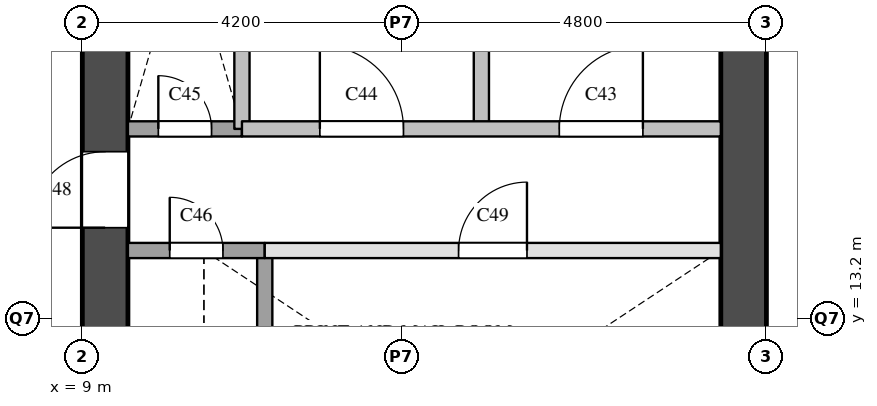
"""IFC4 building model, lengths in metres.
Left out: names, types, materials, properties, quantities, classifications, styles, units other than length and angle.
Written with IfcOpenShell. Run it as: python <this file> out.ifc"""

import sys

from ifc_helpers import new_model, si_unit, direction, frame, frame_2d, origin, place, context, subcontext, project, spatial, rectangle, extrude, element, fill, save


model = new_model("IFC4")
c1 = context("Model", 3, precision=1e-05, world=origin(), true_north=direction((0.0, 1.0)))
c2 = subcontext(c1, "Body", "Model", "MODEL_VIEW")
j1 = project(units=[si_unit("LENGTHUNIT", "METRE"), si_unit("PLANEANGLEUNIT", "RADIAN")], contexts=[c1])
p1 = place(None, origin())
s1 = spatial("IfcSite", under=j1, at=p1, CompositionType="ELEMENT")
p2 = place(p1, origin())
s2 = spatial("IfcBuilding", under=s1, at=p2, CompositionType="ELEMENT")
p3 = place(p2, frame((0.0, 0.0, 50.0)))
s3 = spatial("IfcBuildingStorey", under=s2, at=p3, CompositionType="ELEMENT", Elevation=50.0)
p4 = place(p3, frame((9.3, 9.6, 0.0), z_axis=(0.0, 0.0, 1.0), x_axis=(0.0, 1.0, 0.0)))
e1 = element("IfcWall", 1, at=p4, inside=s3, PredefinedType="SHEAR", context=c2, shape_type="SweptSolid", body=[
    extrude(rectangle(XDim=12.3, YDim=0.6, at=frame_2d((6.15, 0.0))), origin(), (0.0, 0.0, 1.0), 3.5),
])
p5 = place(p4, frame((0.8, 0.0, 0.0)))
e2 = element("IfcOpeningElement", 2, at=p5, cuts=e1, PredefinedType="OPENING", context=c2, shape_type="SweptSolid", body=[
    extrude(rectangle(XDim=0.7, YDim=2.1, at=frame_2d((0.35, 1.05))), frame((0.0, 0.31, 0.0), z_axis=(0.0, -1.0, 0.0), x_axis=(1.0, 0.0, 0.0)), (0.0, 0.0, 1.0), 0.62),
])
p6 = place(p4, frame((4.8, 0.0, 0.0)))
e3 = element("IfcOpeningElement", 3, at=p6, cuts=e1, PredefinedType="OPENING", context=c2, shape_type="SweptSolid", body=[
    extrude(rectangle(XDim=1.0, YDim=2.1, at=frame_2d((0.5, 1.05))), frame((0.0, 0.31, 0.0), z_axis=(0.0, -1.0, 0.0), x_axis=(1.0, 0.0, 0.0)), (0.0, 0.0, 1.0), 0.62),
])
p7 = place(p3, frame((17.7, 9.6, 0.0), z_axis=(0.0, 0.0, 1.0), x_axis=(0.0, 1.0, 0.0)))
e4 = element("IfcWall", 4, at=p7, inside=s3, PredefinedType="SHEAR", context=c2, shape_type="SweptSolid", body=[
    extrude(rectangle(XDim=12.3, YDim=0.6, at=frame_2d((6.15, 0.0))), origin(), (0.0, 0.0, 1.0), 3.5),
])
p8 = place(p7, frame((0.525, 0.0, 0.0)))
e5 = element("IfcOpeningElement", 5, at=p8, cuts=e4, PredefinedType="OPENING", context=c2, shape_type="SweptSolid", body=[
    extrude(rectangle(XDim=1.2, YDim=2.1, at=frame_2d((0.6, 1.05))), frame((0.0, 0.31, 0.0), z_axis=(0.0, -1.0, 0.0), x_axis=(1.0, 0.0, 0.0)), (0.0, 0.0, 1.0), 0.62),
])
p9 = place(p3, frame((11.1, 15.7, 0.0), z_axis=(0.0, 0.0, 1.0), x_axis=(0.0, 1.0, 0.0)))
e6 = element("IfcWall", 6, at=p9, inside=s3, PredefinedType="SOLIDWALL", context=c2, shape_type="SweptSolid", body=[
    extrude(rectangle(XDim=4.3, YDim=0.2, at=frame_2d((2.15, 0.0))), origin(), (0.0, 0.0, 1.0), 3.5),
])
p10 = place(p3, frame((11.4, 11.9, 0.0), z_axis=(0.0, 0.0, 1.0), x_axis=(0.0, 1.0, 0.0)))
e7 = element("IfcWall", 7, at=p10, inside=s3, PredefinedType="SOLIDWALL", context=c2, shape_type="SweptSolid", body=[
    extrude(rectangle(XDim=2.2, YDim=0.2, at=frame_2d((1.1, 0.0))), origin(), (0.0, 0.0, 1.0), 3.5),
])
p11 = place(p3, frame((14.25, 15.7, 0.0), z_axis=(0.0, 0.0, 1.0), x_axis=(0.0, 1.0, 0.0)))
e8 = element("IfcWall", 8, at=p11, inside=s3, PredefinedType="SOLIDWALL", context=c2, shape_type="SweptSolid", body=[
    extrude(rectangle(XDim=4.3, YDim=0.2, at=frame_2d((2.15, 0.0))), origin(), (0.0, 0.0, 1.0), 3.5),
])
p12 = place(p3, frame((11.4, 14.1, 0.0), z_axis=(0.0, 0.0, 1.0), x_axis=(1.0, 0.0, 0.0)))
e9 = element("IfcWall", 9, at=p12, inside=s3, PredefinedType="PARTITIONING", context=c2, shape_type="SweptSolid", body=[
    extrude(rectangle(XDim=6.0, YDim=0.2, at=frame_2d((3.0, 0.0))), origin(), (0.0, 0.0, 1.0), 3.5),
])
p13 = place(p12, frame((2.55, 0.0, 0.0)))
e10 = element("IfcOpeningElement", 10, at=p13, cuts=e9, PredefinedType="OPENING", context=c2, shape_type="SweptSolid", body=[
    extrude(rectangle(XDim=0.9, YDim=2.1, at=frame_2d((0.45, 1.05))), frame((0.0, 0.11, 0.0), z_axis=(0.0, -1.0, 0.0), x_axis=(1.0, 0.0, 0.0)), (0.0, 0.0, 1.0), 0.22),
])
p14 = place(p3, frame((9.6, 14.1, 0.0), z_axis=(0.0, 0.0, 1.0), x_axis=(1.0, 0.0, 0.0)))
e11 = element("IfcWall", 11, at=p14, inside=s3, PredefinedType="SOLIDWALL", context=c2, shape_type="SweptSolid", body=[
    extrude(rectangle(XDim=1.8, YDim=0.2, at=frame_2d((0.9, 0.0))), origin(), (0.0, 0.0, 1.0), 3.5),
])
p15 = place(p14, frame((0.55, 0.0, 0.0)))
e12 = element("IfcOpeningElement", 12, at=p15, cuts=e11, PredefinedType="OPENING", context=c2, shape_type="SweptSolid", body=[
    extrude(rectangle(XDim=0.7, YDim=2.1, at=frame_2d((0.35, 1.05))), frame((0.0, 0.11, 0.0), z_axis=(0.0, -1.0, 0.0), x_axis=(1.0, 0.0, 0.0)), (0.0, 0.0, 1.0), 0.22),
])
p16 = place(p3, frame((9.6, 15.7, 0.0), z_axis=(0.0, 0.0, 1.0), x_axis=(1.0, 0.0, 0.0)))
e13 = element("IfcWall", 13, at=p16, inside=s3, PredefinedType="SOLIDWALL", context=c2, shape_type="SweptSolid", body=[
    extrude(rectangle(XDim=1.5, YDim=0.2, at=frame_2d((0.75, 0.0))), origin(), (0.0, 0.0, 1.0), 3.5),
])
p17 = place(p16, frame((0.4, 0.0, 0.0)))
e14 = element("IfcOpeningElement", 14, at=p17, cuts=e13, PredefinedType="OPENING", context=c2, shape_type="SweptSolid", body=[
    extrude(rectangle(XDim=0.7, YDim=2.1, at=frame_2d((0.35, 1.05))), frame((0.0, 0.11, 0.0), z_axis=(0.0, -1.0, 0.0), x_axis=(1.0, 0.0, 0.0)), (0.0, 0.0, 1.0), 0.22),
])
p18 = place(p3, frame((11.1, 15.7, 0.0), z_axis=(0.0, 0.0, 1.0), x_axis=(1.0, 0.0, 0.0)))
e15 = element("IfcWall", 15, at=p18, inside=s3, PredefinedType="SOLIDWALL", context=c2, shape_type="SweptSolid", body=[
    extrude(rectangle(XDim=6.3, YDim=0.2, at=frame_2d((3.15, 0.0))), origin(), (0.0, 0.0, 1.0), 3.5),
])
p19 = place(p18, frame((4.175, 0.0, 0.0)))
e16 = element("IfcOpeningElement", 16, at=p19, cuts=e15, PredefinedType="OPENING", context=c2, shape_type="SweptSolid", body=[
    extrude(rectangle(XDim=1.1, YDim=2.1, at=frame_2d((0.55, 1.05))), frame((0.0, 0.11, 0.0), z_axis=(0.0, -1.0, 0.0), x_axis=(1.0, 0.0, 0.0)), (0.0, 0.0, 1.0), 0.22),
])
p20 = place(p18, frame((1.025, 0.0, 0.0)))
e17 = element("IfcOpeningElement", 17, at=p20, cuts=e15, PredefinedType="OPENING", context=c2, shape_type="SweptSolid", body=[
    extrude(rectangle(XDim=1.1, YDim=2.1, at=frame_2d((0.55, 1.05))), frame((0.0, 0.11, 0.0), z_axis=(0.0, -1.0, 0.0), x_axis=(1.0, 0.0, 0.0)), (0.0, 0.0, 1.0), 0.22),
])
p21 = place(p19, origin())
e18 = element("IfcDoor", 18, at=p21, inside=s3, OperationType="SINGLE_SWING_RIGHT", PredefinedType="DOOR", context=c2, shape_type="SweptSolid", body=[
    extrude(rectangle(XDim=1.1, YDim=2.1, at=frame_2d((0.55, 1.05))), frame((0.0, 0.025, 0.0), z_axis=(0.0, -1.0, 0.0), x_axis=(1.0, 0.0, 0.0)), (0.0, 0.0, 1.0), 0.05),
])
fill(e16, e18)
p22 = place(p20, origin())
e19 = element("IfcDoor", 19, at=p22, inside=s3, OperationType="SINGLE_SWING_LEFT", PredefinedType="DOOR", context=c2, shape_type="SweptSolid", body=[
    extrude(rectangle(XDim=1.1, YDim=2.1, at=frame_2d((0.55, 1.05))), frame((0.0, 0.025, 0.0), z_axis=(0.0, -1.0, 0.0), x_axis=(1.0, 0.0, 0.0)), (0.0, 0.0, 1.0), 0.05),
])
fill(e17, e19)
p23 = place(p17, origin())
e20 = element("IfcDoor", 20, at=p23, inside=s3, OperationType="SINGLE_SWING_LEFT", PredefinedType="DOOR", context=c2, shape_type="SweptSolid", body=[
    extrude(rectangle(XDim=0.7, YDim=2.1, at=frame_2d((0.35, 1.05))), frame((0.0, 0.025, 0.0), z_axis=(0.0, -1.0, 0.0), x_axis=(1.0, 0.0, 0.0)), (0.0, 0.0, 1.0), 0.05),
])
fill(e14, e20)
p24 = place(p15, origin())
e21 = element("IfcDoor", 21, at=p24, inside=s3, OperationType="SINGLE_SWING_LEFT", PredefinedType="DOOR", context=c2, shape_type="SweptSolid", body=[
    extrude(rectangle(XDim=0.7, YDim=2.1, at=frame_2d((0.35, 1.05))), frame((0.0, 0.025, 0.0), z_axis=(0.0, -1.0, 0.0), x_axis=(1.0, 0.0, 0.0)), (0.0, 0.0, 1.0), 0.05),
])
fill(e12, e21)
p25 = place(p6, origin())
e22 = element("IfcDoor", 22, at=p25, inside=s3, OperationType="SINGLE_SWING_LEFT", PredefinedType="DOOR", context=c2, shape_type="SweptSolid", body=[
    extrude(rectangle(XDim=1.0, YDim=2.1, at=frame_2d((0.5, 1.05))), frame((0.0, 0.025, 0.0), z_axis=(0.0, -1.0, 0.0), x_axis=(1.0, 0.0, 0.0)), (0.0, 0.0, 1.0), 0.05),
])
fill(e3, e22)
p26 = place(p13, origin())
e23 = element("IfcDoor", 23, at=p26, inside=s3, OperationType="SINGLE_SWING_RIGHT", PredefinedType="DOOR", context=c2, shape_type="SweptSolid", body=[
    extrude(rectangle(XDim=0.9, YDim=2.1, at=frame_2d((0.45, 1.05))), frame((0.0, 0.025, 0.0), z_axis=(0.0, -1.0, 0.0), x_axis=(1.0, 0.0, 0.0)), (0.0, 0.0, 1.0), 0.05),
])
fill(e10, e23)
save(model, sys.argv[1])
